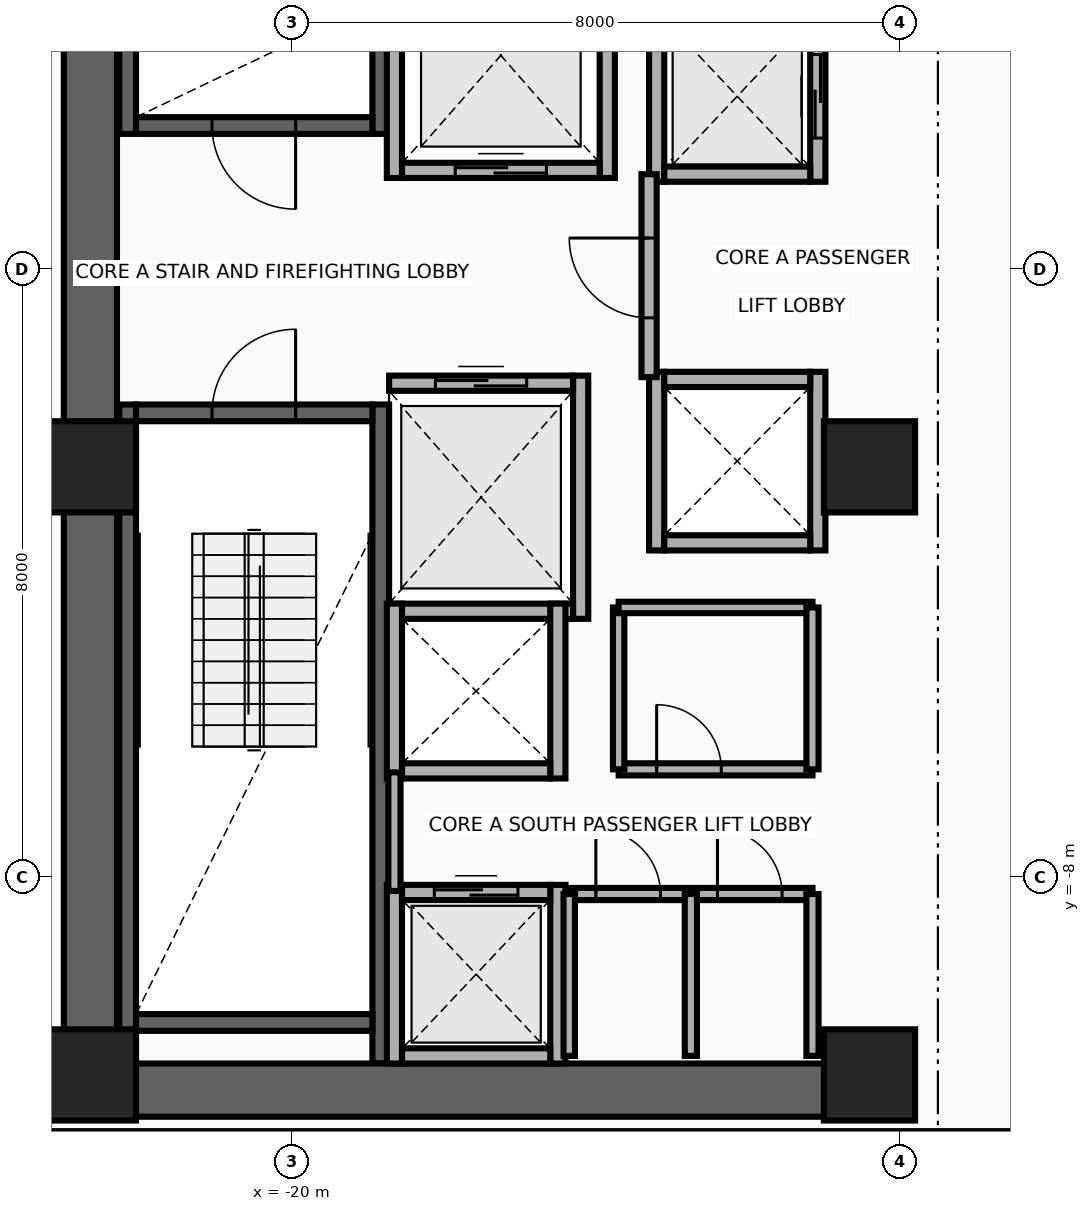
"""IFC4 building model, lengths in metres.
Left out: names, types, materials, properties, quantities, classifications, styles, units other than length and angle.
Written with IfcOpenShell. Run it as: python <this file> out.ifc"""

import sys

from ifc_helpers import new_model, si_unit, direction, frame, frame_2d, origin, origin_2d, place, context, subcontext, project, spatial, rectangle, extrude, source, transform, mapped, element, fill, save


model = new_model("IFC4")
c1 = context("Model", 3, precision=1e-05, world=origin(), true_north=direction((0.0, 1.0)))
c2 = subcontext(c1, "Body", "Model", "MODEL_VIEW")
j1 = project(units=[si_unit("LENGTHUNIT", "METRE"), si_unit("PLANEANGLEUNIT", "RADIAN")], contexts=[c1])
p1 = place(None, origin())
s1 = spatial("IfcSite", under=j1, at=p1, CompositionType="ELEMENT")
p2 = place(p1, origin())
s2 = spatial("IfcBuilding", under=s1, at=p2, CompositionType="ELEMENT")
p3 = place(p2, frame((0.0, 0.0, 116.8)))
s3 = spatial("IfcBuildingStorey", under=s2, at=p3, CompositionType="ELEMENT", Elevation=116.8)
for number, where, z_axis, x_axis in (
    (1, (-22.16, 1.78, 0.0), (0.0, 0.0, 1.0), (0.0, 1.0, 0.0)),
    (2, (-18.83, 1.78, 0.0), (0.0, 0.0, 1.0), (0.0, 1.0, 0.0)),
):
    element("IfcWall", number, at=place(p3, frame(where, z_axis=z_axis, x_axis=x_axis)), inside=s3, PredefinedType="SHEAR", context=c2, shape_type="SweptSolid", body=[
        extrude(rectangle(XDim=8.67, YDim=0.22, at=frame_2d((4.335, 0.0))), origin(), (0.0, 0.0, 1.0), 3.46),
    ])
p4 = place(p3, frame((-22.05, 1.89, 0.0), z_axis=(0.0, 0.0, 1.0), x_axis=(1.0, 0.0, 0.0)))
e3 = element("IfcWall", 3, at=p4, inside=s3, PredefinedType="SHEAR", context=c2, shape_type="SweptSolid", body=[
    extrude(rectangle(XDim=3.11, YDim=0.22, at=frame_2d((1.555, 0.0))), origin(), (0.0, 0.0, 1.0), 3.46),
])
p5 = place(p4, frame((1.0, 0.0, 0.0)))
e4 = element("IfcOpeningElement", 4, at=p5, cuts=e3, PredefinedType="OPENING", context=c2, shape_type="SweptSolid", body=[
    extrude(rectangle(XDim=1.1, YDim=2.15, at=frame_2d((0.55, 1.075))), frame((0.0, 0.125, 0.0), z_axis=(0.0, -1.0, 0.0), x_axis=(1.0, 0.0, 0.0)), (0.0, 0.0, 1.0), 0.25),
])
for number, where, z_axis, x_axis in (
    (5, (-22.16, -10.45, 0.0), (0.0, 0.0, 1.0), (0.0, 1.0, 0.0)),
    (6, (-18.83, -10.45, 0.0), (0.0, 0.0, 1.0), (0.0, 1.0, 0.0)),
):
    element("IfcWall", number, at=place(p3, frame(where, z_axis=z_axis, x_axis=x_axis)), inside=s3, PredefinedType="SHEAR", context=c2, shape_type="SweptSolid", body=[
        extrude(rectangle(XDim=8.67, YDim=0.22, at=frame_2d((4.335, 0.0))), origin(), (0.0, 0.0, 1.0), 3.46),
    ])
p6 = place(p3, frame((-22.05, -9.91, 0.0), z_axis=(0.0, 0.0, 1.0), x_axis=(1.0, 0.0, 0.0)))
e7 = element("IfcWall", 7, at=p6, inside=s3, PredefinedType="SHEAR", context=c2, shape_type="SweptSolid", body=[
    extrude(rectangle(XDim=3.11, YDim=0.22, at=frame_2d((1.555, 0.0))), origin(), (0.0, 0.0, 1.0), 3.46),
])
p7 = place(p3, frame((-22.05, -1.89, 0.0), z_axis=(0.0, 0.0, 1.0), x_axis=(1.0, 0.0, 0.0)))
e8 = element("IfcWall", 8, at=p7, inside=s3, PredefinedType="SHEAR", context=c2, shape_type="SweptSolid", body=[
    extrude(rectangle(XDim=3.11, YDim=0.22, at=frame_2d((1.555, 0.0))), origin(), (0.0, 0.0, 1.0), 3.46),
])
p8 = place(p7, frame((1.0, 0.0, 0.0)))
e9 = element("IfcOpeningElement", 9, at=p8, cuts=e8, PredefinedType="OPENING", context=c2, shape_type="SweptSolid", body=[
    extrude(rectangle(XDim=1.1, YDim=2.15, at=frame_2d((0.55, 1.075))), frame((0.0, 0.125, 0.0), z_axis=(0.0, -1.0, 0.0), x_axis=(1.0, 0.0, 0.0)), (0.0, 0.0, 1.0), 0.25),
])
p9 = place(p3, frame((-22.65, -11.15, 0.0), z_axis=(0.0, 0.0, 1.0), x_axis=(0.0, 1.0, 0.0)))
e10 = element("IfcWall", 10, at=p9, inside=s3, PredefinedType="SHEAR", context=c2, shape_type="SweptSolid", body=[
    extrude(rectangle(XDim=22.3, YDim=0.7, at=frame_2d((11.15, 0.0))), origin(), (0.0, 0.0, 1.0), 3.46),
])
p10 = place(p3, frame((-22.65, -10.8, 0.0), z_axis=(0.0, 0.0, 1.0), x_axis=(1.0, 0.0, 0.0)))
e11 = element("IfcWall", 11, at=p10, inside=s3, PredefinedType="SHEAR", context=c2, shape_type="SweptSolid", body=[
    extrude(rectangle(XDim=10.25, YDim=0.7, at=frame_2d((5.125, 0.0))), origin(), (0.0, 0.0, 1.0), 3.46),
])
m1 = source(origin(), c2, "Body", "SweptSolid", [
    extrude(rectangle(XDim=1.2, YDim=1.2, at=origin_2d()), origin(), (0.0, 0.0, 1.0), 3.7),
])
for number, where, z_axis, x_axis in (
    (12, (-22.65, -10.6, 0.0), (0.0, 0.0, 1.0), (1.0, 0.0, 0.0)),
    (13, (-12.4, -10.6, 0.0), (0.0, 0.0, 1.0), (1.0, 0.0, 0.0)),
    (14, (-22.65, -2.6, 0.0), (0.0, 0.0, 1.0), (1.0, 0.0, 0.0)),
    (15, (-12.4, -2.6, 0.0), (0.0, 0.0, 1.0), (1.0, 0.0, 0.0)),
):
    element("IfcColumn", number, at=place(p3, frame(where, z_axis=z_axis, x_axis=x_axis)), inside=s3, PredefinedType="COLUMN", context=c2, shape_type="MappedRepresentation", body=[
        mapped(m1, transform((0.0, 0.0, 0.0), x_axis=(1.0, 0.0, 0.0), y_axis=(0.0, 1.0, 0.0), z_axis=(0.0, 0.0, 1.0), scale=1.0)),
    ])
for number, where, z_axis, x_axis in (
    (16, (-18.65, 1.2, 0.0), (0.0, 0.0, 1.0), (0.0, 1.0, 0.0)),
    (17, (-15.85, 1.2, 0.0), (0.0, 0.0, 1.0), (0.0, 1.0, 0.0)),
):
    element("IfcWall", number, at=place(p3, frame(where, z_axis=z_axis, x_axis=x_axis)), inside=s3, PredefinedType="MOVABLE", context=c2, shape_type="SweptSolid", body=[
        extrude(rectangle(XDim=3.225, YDim=0.2, at=frame_2d((1.613, 0.0))), origin(), (0.0, 0.0, 1.0), 3.46),
    ])
p11 = place(p3, frame((-18.55, 1.3, 0.0), z_axis=(0.0, 0.0, 1.0), x_axis=(1.0, 0.0, 0.0)))
e18 = element("IfcWall", 18, at=p11, inside=s3, PredefinedType="MOVABLE", context=c2, shape_type="SweptSolid", body=[
    extrude(rectangle(XDim=2.6, YDim=0.2, at=frame_2d((1.3, 0.0))), origin(), (0.0, 0.0, 1.0), 3.46),
])
p12 = place(p11, frame((0.7, 0.0, 0.0)))
e19 = element("IfcOpeningElement", 19, at=p12, cuts=e18, PredefinedType="OPENING", context=c2, shape_type="SweptSolid", body=[
    extrude(rectangle(XDim=1.2, YDim=2.1, at=frame_2d((0.6, 1.05))), frame((0.0, 0.115, 0.0), z_axis=(0.0, -1.0, 0.0), x_axis=(1.0, 0.0, 0.0)), (0.0, 0.0, 1.0), 0.23),
])
p13 = place(p3, frame((-16.2, -4.6, 0.0), z_axis=(0.0, 0.0, 1.0), x_axis=(0.0, 1.0, 0.0)))
e20 = element("IfcWall", 20, at=p13, inside=s3, PredefinedType="MOVABLE", context=c2, shape_type="SweptSolid", body=[
    extrude(rectangle(XDim=3.2, YDim=0.2, at=frame_2d((1.6, 0.0))), origin(), (0.0, 0.0, 1.0), 3.46),
])
p14 = place(p3, frame((-18.72, -4.5, 0.0), z_axis=(0.0, 0.0, 1.0), x_axis=(1.0, 0.0, 0.0)))
e21 = element("IfcWall", 21, at=p14, inside=s3, PredefinedType="MOVABLE", context=c2, shape_type="SweptSolid", body=[
    extrude(rectangle(XDim=2.42, YDim=0.2, at=frame_2d((1.21, 0.0))), origin(), (0.0, 0.0, 1.0), 3.46),
])
p15 = place(p3, frame((-18.72, -1.5, 0.0), z_axis=(0.0, 0.0, 1.0), x_axis=(1.0, 0.0, 0.0)))
e22 = element("IfcWall", 22, at=p15, inside=s3, PredefinedType="MOVABLE", context=c2, shape_type="SweptSolid", body=[
    extrude(rectangle(XDim=2.42, YDim=0.2, at=frame_2d((1.21, 0.0))), origin(), (0.0, 0.0, 1.0), 3.46),
])
p16 = place(p15, frame((0.61, 0.0, 0.0)))
e23 = element("IfcOpeningElement", 23, at=p16, cuts=e22, PredefinedType="OPENING", context=c2, shape_type="SweptSolid", body=[
    extrude(rectangle(XDim=1.2, YDim=2.1, at=frame_2d((0.6, 1.05))), frame((0.0, 0.115, 0.0), z_axis=(0.0, -1.0, 0.0), x_axis=(1.0, 0.0, 0.0)), (0.0, 0.0, 1.0), 0.23),
])
for number, where, z_axis, x_axis in (
    (24, (-18.65, -10.45, 0.0), (0.0, 0.0, 1.0), (0.0, 1.0, 0.0)),
    (25, (-16.5, -10.45, 0.0), (0.0, 0.0, 1.0), (0.0, 1.0, 0.0)),
):
    element("IfcWall", number, at=place(p3, frame(where, z_axis=z_axis, x_axis=x_axis)), inside=s3, PredefinedType="MOVABLE", context=c2, shape_type="SweptSolid", body=[
        extrude(rectangle(XDim=2.35, YDim=0.2, at=frame_2d((1.175, 0.0))), origin(), (0.0, 0.0, 1.0), 2.666),
    ])
p17 = place(p3, frame((-18.55, -10.35, 0.0), z_axis=(0.0, 0.0, 1.0), x_axis=(1.0, 0.0, 0.0)))
e26 = element("IfcWall", 26, at=p17, inside=s3, PredefinedType="MOVABLE", context=c2, shape_type="SweptSolid", body=[
    extrude(rectangle(XDim=1.95, YDim=0.2, at=frame_2d((0.975, 0.0))), origin(), (0.0, 0.0, 1.0), 2.666),
])
p18 = place(p3, frame((-18.55, -8.2, 0.0), z_axis=(0.0, 0.0, 1.0), x_axis=(1.0, 0.0, 0.0)))
e27 = element("IfcWall", 27, at=p18, inside=s3, PredefinedType="MOVABLE", context=c2, shape_type="SweptSolid", body=[
    extrude(rectangle(XDim=1.95, YDim=0.2, at=frame_2d((0.975, 0.0))), origin(), (0.0, 0.0, 1.0), 3.46),
])
p19 = place(p18, frame((0.425, 0.0, 0.0)))
e28 = element("IfcOpeningElement", 28, at=p19, cuts=e27, PredefinedType="OPENING", context=c2, shape_type="SweptSolid", body=[
    extrude(rectangle(XDim=1.1, YDim=2.1, at=frame_2d((0.55, 1.05))), frame((0.0, 0.115, 0.0), z_axis=(0.0, -1.0, 0.0), x_axis=(1.0, 0.0, 0.0)), (0.0, 0.0, 1.0), 0.23),
])
p20 = place(p3, frame((-15.2, 1.15, 0.0), z_axis=(0.0, 0.0, 1.0), x_axis=(0.0, 1.0, 0.0)))
e29 = element("IfcWall", 29, at=p20, inside=s3, PredefinedType="MOVABLE", context=c2, shape_type="SweptSolid", body=[
    extrude(rectangle(XDim=2.25, YDim=0.2, at=frame_2d((1.125, 0.0))), origin(), (0.0, 0.0, 1.0), 3.46),
])
p21 = place(p3, frame((-13.08, 1.15, 0.0), z_axis=(0.0, 0.0, 1.0), x_axis=(0.0, 1.0, 0.0)))
e30 = element("IfcWall", 30, at=p21, inside=s3, PredefinedType="MOVABLE", context=c2, shape_type="SweptSolid", body=[
    extrude(rectangle(XDim=2.25, YDim=0.2, at=frame_2d((1.125, 0.0))), origin(), (0.0, 0.0, 1.0), 3.46),
])
p22 = place(p21, frame((0.575, 0.0, 0.0)))
e31 = element("IfcOpeningElement", 31, at=p22, cuts=e30, PredefinedType="OPENING", context=c2, shape_type="SweptSolid", body=[
    extrude(rectangle(XDim=1.1, YDim=2.1, at=frame_2d((0.55, 1.05))), frame((0.0, 0.115, 0.0), z_axis=(0.0, -1.0, 0.0), x_axis=(1.0, 0.0, 0.0)), (0.0, 0.0, 1.0), 0.23),
])
p23 = place(p3, frame((-15.1, 1.25, 0.0), z_axis=(0.0, 0.0, 1.0), x_axis=(1.0, 0.0, 0.0)))
e32 = element("IfcWall", 32, at=p23, inside=s3, PredefinedType="MOVABLE", context=c2, shape_type="SweptSolid", body=[
    extrude(rectangle(XDim=1.92, YDim=0.2, at=frame_2d((0.96, 0.0))), origin(), (0.0, 0.0, 1.0), 3.46),
])
for number, where, z_axis, x_axis in (
    (33, (-18.65, -6.7, 0.0), (0.0, 0.0, 1.0), (0.0, 1.0, 0.0)),
    (34, (-16.5, -6.7, 0.0), (0.0, 0.0, 1.0), (0.0, 1.0, 0.0)),
):
    element("IfcWall", number, at=place(p3, frame(where, z_axis=z_axis, x_axis=x_axis)), inside=s3, PredefinedType="MOVABLE", context=c2, shape_type="SweptSolid", body=[
        extrude(rectangle(XDim=2.3, YDim=0.2, at=frame_2d((1.15, 0.0))), origin(), (0.0, 0.0, 1.0), 3.46),
    ])
p24 = place(p3, frame((-18.55, -6.6, 0.0), z_axis=(0.0, 0.0, 1.0), x_axis=(1.0, 0.0, 0.0)))
e35 = element("IfcWall", 35, at=p24, inside=s3, PredefinedType="MOVABLE", context=c2, shape_type="SweptSolid", body=[
    extrude(rectangle(XDim=1.95, YDim=0.2, at=frame_2d((0.975, 0.0))), origin(), (0.0, 0.0, 1.0), 3.46),
])
for number, where, z_axis, x_axis in (
    (36, (-15.2, -3.7, 0.0), (0.0, 0.0, 1.0), (0.0, 1.0, 0.0)),
    (37, (-13.08, -3.7, 0.0), (0.0, 0.0, 1.0), (0.0, 1.0, 0.0)),
):
    element("IfcWall", number, at=place(p3, frame(where, z_axis=z_axis, x_axis=x_axis)), inside=s3, PredefinedType="MOVABLE", context=c2, shape_type="SweptSolid", body=[
        extrude(rectangle(XDim=2.35, YDim=0.2, at=frame_2d((1.175, 0.0))), origin(), (0.0, 0.0, 1.0), 3.46),
    ])
for number, where, z_axis, x_axis in (
    (38, (-15.1, -3.6, 0.0), (0.0, 0.0, 1.0), (1.0, 0.0, 0.0)),
    (39, (-15.1, -1.45, 0.0), (0.0, 0.0, 1.0), (1.0, 0.0, 0.0)),
):
    element("IfcWall", number, at=place(p3, frame(where, z_axis=z_axis, x_axis=x_axis)), inside=s3, PredefinedType="MOVABLE", context=c2, shape_type="SweptSolid", body=[
        extrude(rectangle(XDim=1.92, YDim=0.2, at=frame_2d((0.96, 0.0))), origin(), (0.0, 0.0, 1.0), 3.46),
    ])
p25 = place(p3, frame((-15.3, -1.42, 0.0), z_axis=(0.0, 0.0, 1.0), x_axis=(0.0, 1.0, 0.0)))
e40 = element("IfcWall", 40, at=p25, inside=s3, PredefinedType="PARTITIONING", context=c2, shape_type="SweptSolid", body=[
    extrude(rectangle(XDim=2.67, YDim=0.2, at=frame_2d((1.335, 0.0))), origin(), (0.0, 0.0, 1.0), 3.46),
])
p26 = place(p25, frame((0.78, 0.0, 0.0)))
e41 = element("IfcOpeningElement", 41, at=p26, cuts=e40, PredefinedType="OPENING", context=c2, shape_type="SweptSolid", body=[
    extrude(rectangle(XDim=1.05, YDim=2.15, at=frame_2d((0.525, 1.075))), frame((0.0, 0.115, 0.0), z_axis=(0.0, -1.0, 0.0), x_axis=(1.0, 0.0, 0.0)), (0.0, 0.0, 1.0), 0.23),
])
p27 = place(p3, frame((-18.65, -8.18, 0.0), z_axis=(0.0, 0.0, 1.0), x_axis=(0.0, 1.0, 0.0)))
e42 = element("IfcWall", 42, at=p27, inside=s3, PredefinedType="PARTITIONING", context=c2, shape_type="SweptSolid", body=[
    extrude(rectangle(XDim=1.56, YDim=0.16, at=frame_2d((0.78, 0.0))), origin(), (0.0, 0.0, 1.0), 3.46),
])
p28 = place(p3, frame((-16.35, -8.22, 0.0), z_axis=(0.0, 0.0, 1.0), x_axis=(1.0, 0.0, 0.0)))
e43 = element("IfcWall", 43, at=p28, inside=s3, PredefinedType="PARTITIONING", context=c2, shape_type="SweptSolid", body=[
    extrude(rectangle(XDim=3.2, YDim=0.16, at=frame_2d((1.6, 0.0))), origin(), (0.0, 0.0, 1.0), 3.46),
])
p29 = place(p28, frame((0.35, 0.0, 0.0)))
e44 = element("IfcOpeningElement", 44, at=p29, cuts=e43, PredefinedType="OPENING", context=c2, shape_type="SweptSolid", body=[
    extrude(rectangle(XDim=0.85, YDim=2.05, at=frame_2d((0.425, 1.025))), frame((0.0, 0.095, 0.0), z_axis=(0.0, -1.0, 0.0), x_axis=(1.0, 0.0, 0.0)), (0.0, 0.0, 1.0), 0.19),
])
p30 = place(p28, frame((1.95, 0.0, 0.0)))
e45 = element("IfcOpeningElement", 45, at=p30, cuts=e43, PredefinedType="OPENING", context=c2, shape_type="SweptSolid", body=[
    extrude(rectangle(XDim=0.85, YDim=2.05, at=frame_2d((0.425, 1.025))), frame((0.0, 0.095, 0.0), z_axis=(0.0, -1.0, 0.0), x_axis=(1.0, 0.0, 0.0)), (0.0, 0.0, 1.0), 0.19),
])
p31 = place(p3, frame((-16.35, -10.35, 0.0), z_axis=(0.0, 0.0, 1.0), x_axis=(0.0, 1.0, 0.0)))
e46 = element("IfcWall", 46, at=p31, inside=s3, PredefinedType="PARTITIONING", context=c2, shape_type="SweptSolid", body=[
    extrude(rectangle(XDim=2.13, YDim=0.15, at=frame_2d((1.065, 0.0))), origin(), (0.0, 0.0, 1.0), 3.46),
])
for number, where, z_axis, x_axis in (
    (47, (-13.15, -10.35, 0.0), (0.0, 0.0, 1.0), (0.0, 1.0, 0.0)),
    (48, (-14.75, -10.35, 0.0), (0.0, 0.0, 1.0), (0.0, 1.0, 0.0)),
):
    element("IfcWall", number, at=place(p3, frame(where, z_axis=z_axis, x_axis=x_axis)), inside=s3, PredefinedType="PARTITIONING", context=c2, shape_type="SweptSolid", body=[
        extrude(rectangle(XDim=2.13, YDim=0.16, at=frame_2d((1.065, 0.0))), origin(), (0.0, 0.0, 1.0), 3.46),
    ])
p32 = place(p3, frame((-15.7, -6.58, 0.0), z_axis=(0.0, 0.0, 1.0), x_axis=(1.0, 0.0, 0.0)))
e49 = element("IfcWall", 49, at=p32, inside=s3, PredefinedType="PARTITIONING", context=c2, shape_type="SweptSolid", body=[
    extrude(rectangle(XDim=2.55, YDim=0.16, at=frame_2d((1.275, 0.0))), origin(), (0.0, 0.0, 1.0), 3.46),
])
p33 = place(p32, frame((0.5, 0.0, 0.0)))
e50 = element("IfcOpeningElement", 50, at=p33, cuts=e49, PredefinedType="OPENING", context=c2, shape_type="SweptSolid", body=[
    extrude(rectangle(XDim=0.85, YDim=2.05, at=frame_2d((0.425, 1.025))), frame((0.0, 0.095, 0.0), z_axis=(0.0, -1.0, 0.0), x_axis=(1.0, 0.0, 0.0)), (0.0, 0.0, 1.0), 0.19),
])
p34 = place(p3, frame((-15.7, -6.58, 0.0), z_axis=(0.0, 0.0, 1.0), x_axis=(0.0, 1.0, 0.0)))
e51 = element("IfcWall", 51, at=p34, inside=s3, PredefinedType="PARTITIONING", context=c2, shape_type="SweptSolid", body=[
    extrude(rectangle(XDim=2.13, YDim=0.15, at=frame_2d((1.065, 0.0))), origin(), (0.0, 0.0, 1.0), 3.46),
])
p35 = place(p3, frame((-15.7, -4.45, 0.0), z_axis=(0.0, 0.0, 1.0), x_axis=(1.0, 0.0, 0.0)))
e52 = element("IfcWall", 52, at=p35, inside=s3, PredefinedType="PARTITIONING", context=c2, shape_type="SweptSolid", body=[
    extrude(rectangle(XDim=2.55, YDim=0.15, at=frame_2d((1.275, 0.0))), origin(), (0.0, 0.0, 1.0), 3.46),
])
p36 = place(p3, frame((-13.15, -6.58, 0.0), z_axis=(0.0, 0.0, 1.0), x_axis=(0.0, 1.0, 0.0)))
e53 = element("IfcWall", 53, at=p36, inside=s3, PredefinedType="PARTITIONING", context=c2, shape_type="SweptSolid", body=[
    extrude(rectangle(XDim=2.13, YDim=0.16, at=frame_2d((1.065, 0.0))), origin(), (0.0, 0.0, 1.0), 3.46),
])
p37 = place(p3, frame((-23.45, -11.42, 0.0), z_axis=(0.0, 0.0, 1.0), x_axis=(1.0, 0.0, 0.0)))
e54 = element("IfcWall", 54, at=p37, inside=s3, PredefinedType="PARTITIONING", context=c2, shape_type="SweptSolid", body=[
    extrude(rectangle(XDim=13.84, YDim=0.16, at=frame_2d((6.92, 0.0))), origin(), (0.0, 0.0, 1.0), 2.834),
])
p38 = place(p12, origin())
e55 = element("IfcDoor", 55, at=p38, inside=s3, OperationType="DOUBLE_DOOR_SLIDING", PredefinedType="DOOR", context=c2, shape_type="SweptSolid", body=[
    extrude(rectangle(XDim=1.2, YDim=2.1, at=frame_2d((0.6, 1.05))), frame((0.0, 0.025, 0.0), z_axis=(0.0, -1.0, 0.0), x_axis=(1.0, 0.0, 0.0)), (0.0, 0.0, 1.0), 0.05),
])
fill(e19, e55)
p39 = place(p16, origin())
e56 = element("IfcDoor", 56, at=p39, inside=s3, OperationType="DOUBLE_DOOR_SLIDING", PredefinedType="DOOR", context=c2, shape_type="SweptSolid", body=[
    extrude(rectangle(XDim=1.2, YDim=2.1, at=frame_2d((0.6, 1.05))), frame((0.0, 0.025, 0.0), z_axis=(0.0, -1.0, 0.0), x_axis=(1.0, 0.0, 0.0)), (0.0, 0.0, 1.0), 0.05),
])
fill(e23, e56)
p40 = place(p19, origin())
e57 = element("IfcDoor", 57, at=p40, inside=s3, OperationType="DOUBLE_DOOR_SLIDING", PredefinedType="DOOR", context=c2, shape_type="SweptSolid", body=[
    extrude(rectangle(XDim=1.1, YDim=2.1, at=frame_2d((0.55, 1.05))), frame((0.0, 0.025, 0.0), z_axis=(0.0, -1.0, 0.0), x_axis=(1.0, 0.0, 0.0)), (0.0, 0.0, 1.0), 0.05),
])
fill(e28, e57)
p41 = place(p22, origin())
e58 = element("IfcDoor", 58, at=p41, inside=s3, OperationType="DOUBLE_DOOR_SLIDING", PredefinedType="DOOR", context=c2, shape_type="SweptSolid", body=[
    extrude(rectangle(XDim=1.1, YDim=2.1, at=frame_2d((0.55, 1.05))), frame((0.0, 0.025, 0.0), z_axis=(0.0, -1.0, 0.0), x_axis=(1.0, 0.0, 0.0)), (0.0, 0.0, 1.0), 0.05),
])
fill(e31, e58)
p42 = place(p26, origin())
e59 = element("IfcDoor", 59, at=p42, inside=s3, OperationType="SINGLE_SWING_RIGHT", PredefinedType="DOOR", context=c2, shape_type="SweptSolid", body=[
    extrude(rectangle(XDim=1.05, YDim=2.15, at=frame_2d((0.525, 1.075))), frame((0.0, 0.025, 0.0), z_axis=(0.0, -1.0, 0.0), x_axis=(1.0, 0.0, 0.0)), (0.0, 0.0, 1.0), 0.05),
])
fill(e41, e59)
p43 = place(p5, frame((1.1, 0.0, 0.0), z_axis=(0.0, 0.0, 1.0), x_axis=(-1.0, 0.0, 0.0)))
e60 = element("IfcDoor", 60, at=p43, inside=s3, OperationType="SINGLE_SWING_LEFT", PredefinedType="DOOR", context=c2, shape_type="SweptSolid", body=[
    extrude(rectangle(XDim=1.1, YDim=2.15, at=frame_2d((0.55, 1.075))), frame((0.0, 0.025, 0.0), z_axis=(0.0, -1.0, 0.0), x_axis=(1.0, 0.0, 0.0)), (0.0, 0.0, 1.0), 0.05),
])
fill(e4, e60)
p44 = place(p8, origin())
e61 = element("IfcDoor", 61, at=p44, inside=s3, OperationType="SINGLE_SWING_RIGHT", PredefinedType="DOOR", context=c2, shape_type="SweptSolid", body=[
    extrude(rectangle(XDim=1.1, YDim=2.15, at=frame_2d((0.55, 1.075))), frame((0.0, 0.025, 0.0), z_axis=(0.0, -1.0, 0.0), x_axis=(1.0, 0.0, 0.0)), (0.0, 0.0, 1.0), 0.05),
])
fill(e9, e61)
p45 = place(p29, origin())
e62 = element("IfcDoor", 62, at=p45, inside=s3, OperationType="SINGLE_SWING_RIGHT", PredefinedType="DOOR", context=c2, shape_type="SweptSolid", body=[
    extrude(rectangle(XDim=0.85, YDim=2.05, at=frame_2d((0.425, 1.025))), frame((0.0, 0.025, 0.0), z_axis=(0.0, -1.0, 0.0), x_axis=(1.0, 0.0, 0.0)), (0.0, 0.0, 1.0), 0.05),
])
fill(e44, e62)
p46 = place(p30, origin())
e63 = element("IfcDoor", 63, at=p46, inside=s3, OperationType="SINGLE_SWING_LEFT", PredefinedType="DOOR", context=c2, shape_type="SweptSolid", body=[
    extrude(rectangle(XDim=0.85, YDim=2.05, at=frame_2d((0.425, 1.025))), frame((0.0, 0.025, 0.0), z_axis=(0.0, -1.0, 0.0), x_axis=(1.0, 0.0, 0.0)), (0.0, 0.0, 1.0), 0.05),
])
fill(e45, e63)
p47 = place(p33, origin())
e64 = element("IfcDoor", 64, at=p47, inside=s3, OperationType="SINGLE_SWING_RIGHT", PredefinedType="DOOR", context=c2, shape_type="SweptSolid", body=[
    extrude(rectangle(XDim=0.85, YDim=2.05, at=frame_2d((0.425, 1.025))), frame((0.0, 0.025, 0.0), z_axis=(0.0, -1.0, 0.0), x_axis=(1.0, 0.0, 0.0)), (0.0, 0.0, 1.0), 0.05),
])
fill(e50, e64)
save(model, sys.argv[1])
